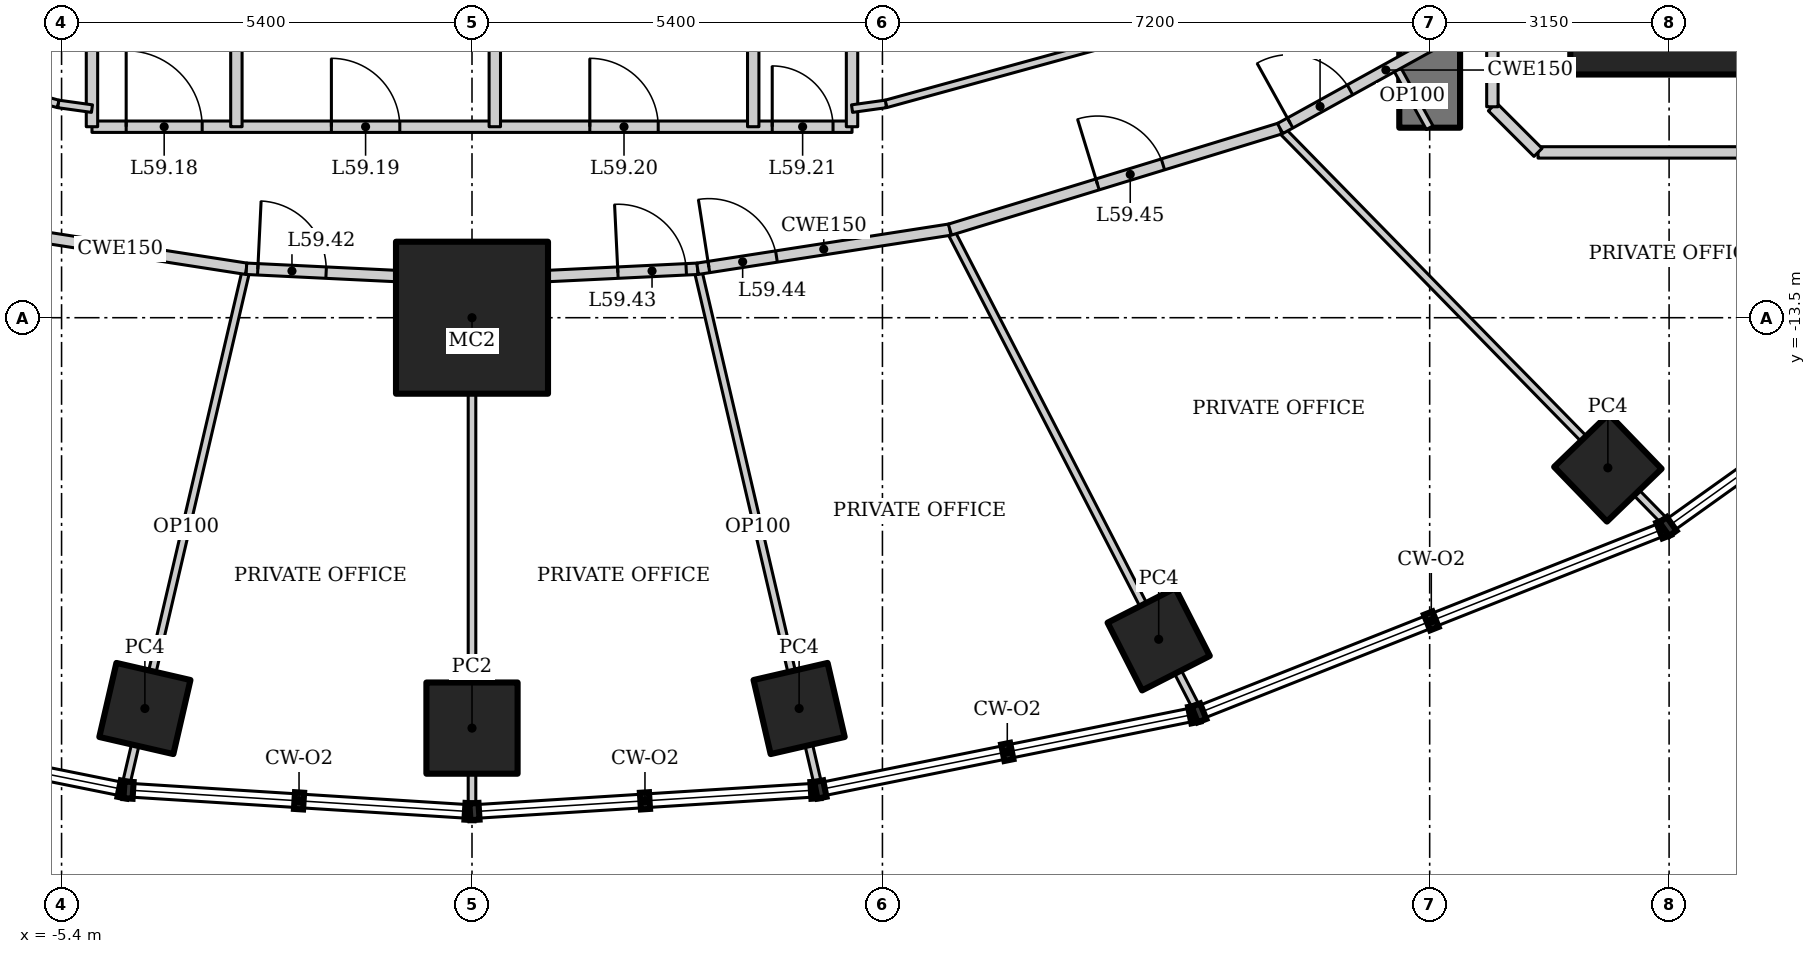
"""IFC4 building model, lengths in metres.
Left out: names, types, materials, properties, quantities, classifications, styles, units other than length and angle.
Written with IfcOpenShell. Run it as: python <this file> out.ifc"""

import sys

from ifc_helpers import new_model, si_unit, direction, frame, frame_2d, origin, origin_2d, place, context, subcontext, project, spatial, rectangle, hollow_rectangle, extrude, element, fill, save


model = new_model("IFC4")
c1 = context("Model", 3, precision=1e-05, world=origin(), true_north=direction((0.0, 1.0)))
c2 = subcontext(c1, "Body", "Model", "MODEL_VIEW")
j1 = project(units=[si_unit("LENGTHUNIT", "METRE"), si_unit("PLANEANGLEUNIT", "RADIAN")], contexts=[c1])
p1 = place(None, origin())
s1 = spatial("IfcSite", under=j1, at=p1, CompositionType="ELEMENT")
p2 = place(p1, origin())
s2 = spatial("IfcBuilding", under=s1, at=p2, CompositionType="ELEMENT")
p3 = place(p2, frame((0.0, 0.0, 253.6)))
s3 = spatial("IfcBuildingStorey", under=s2, at=p3, CompositionType="ELEMENT", Elevation=253.6)
p4 = place(p3, frame((0.0, -13.5, 0.0), z_axis=(0.0, 0.0, 1.0), x_axis=(1.0, 0.0, 0.0)))
e1 = element("IfcColumn", 1, at=p4, inside=s3, PredefinedType="COLUMN", context=c2, shape_type="SweptSolid", body=[
    extrude(hollow_rectangle(XDim=2.0, YDim=2.0, WallThickness=0.17, at=origin_2d()), origin(), (0.0, 0.0, 1.0), 4.2),
])
p5 = place(p3, frame((15.75, -9.0, 0.0), z_axis=(0.0, 0.0, 1.0), x_axis=(1.0, 0.0, 0.0)))
e2 = element("IfcColumn", 2, at=p5, inside=s3, PredefinedType="COLUMN", context=c2, shape_type="SweptSolid", body=[
    extrude(hollow_rectangle(XDim=2.6, YDim=2.6, WallThickness=0.13, at=origin_2d()), origin(), (0.0, 0.0, 1.0), 4.2),
])
p6 = place(p3, frame((-4.304, -18.642, 0.0), z_axis=(0.0, 0.0, 1.0), x_axis=(0.224951054344, 0.974370064785, 0.0)))
e3 = element("IfcColumn", 3, at=p6, inside=s3, PredefinedType="COLUMN", context=c2, shape_type="SweptSolid", body=[
    extrude(hollow_rectangle(XDim=1.0, YDim=1.0, WallThickness=0.08, at=origin_2d()), origin(), (0.0, 0.0, 1.0), 4.2),
])
p7 = place(p3, frame((0.0, -18.9, 0.0), z_axis=(0.0, 0.0, 1.0), x_axis=(1.0, 0.0, 0.0)))
e4 = element("IfcColumn", 4, at=p7, inside=s3, PredefinedType="COLUMN", context=c2, shape_type="SweptSolid", body=[
    extrude(hollow_rectangle(XDim=1.2, YDim=1.2, WallThickness=0.1, at=origin_2d()), origin(), (0.0, 0.0, 1.0), 4.2),
])
for number, where, z_axis, x_axis in (
    (5, (4.304, -18.642, 0.0), (0.0, 0.0, 1.0), (0.974, 0.225, 0.0)),
    (6, (9.035, -17.731, 0.0), (0.0, 0.0, 1.0), (0.891, 0.454, 0.0)),
    (7, (14.944, -15.475, 0.0), (0.0, 0.0, 1.0), (0.719, 0.695, 0.0)),
):
    element("IfcColumn", number, at=place(p3, frame(where, z_axis=z_axis, x_axis=x_axis)), inside=s3, PredefinedType="COLUMN", context=c2, shape_type="SweptSolid", body=[
        extrude(hollow_rectangle(XDim=1.0, YDim=1.0, WallThickness=0.08, at=origin_2d()), origin(), (0.0, 0.0, 1.0), 4.2),
    ])
p8 = place(p3, frame((12.6, -11.0, 0.0), z_axis=(0.0, 0.0, 1.0), x_axis=(0.0, 1.0, 0.0)))
e8 = element("IfcWall", 8, at=p8, inside=s3, PredefinedType="SHEAR", context=c2, shape_type="SweptSolid", body=[
    extrude(rectangle(XDim=22.0, YDim=0.8, at=frame_2d((11.0, 0.0))), origin(), (0.0, 0.0, 1.0), 4.2),
])
p9 = place(p8, frame((10.1, 0.0, 0.0)))
e9 = element("IfcOpeningElement", 9, at=p9, cuts=e8, PredefinedType="OPENING", context=c2, shape_type="SweptSolid", body=[
    extrude(rectangle(XDim=1.8, YDim=2.1, at=frame_2d((0.9, 1.05))), frame((0.0, 0.41, 0.0), z_axis=(0.0, -1.0, 0.0), x_axis=(1.0, 0.0, 0.0)), (0.0, 0.0, 1.0), 0.82),
])
p10 = place(p3, frame((-4.556, -19.657, 0.0), z_axis=(0.0, 0.0, 1.0), x_axis=(0.22733791689, 0.973815933092, 0.0)))
e10 = element("IfcWall", 10, at=p10, inside=s3, PredefinedType="PARTITIONING", context=c2, shape_type="SweptSolid", body=[
    extrude(rectangle(XDim=6.984, YDim=0.1, at=frame_2d((3.492, 0.0))), origin(), (0.0, 0.0, 1.0), 3.293),
])
p11 = place(p3, frame((0.0, -19.945, 0.0), z_axis=(0.0, 0.0, 1.0), x_axis=(0.0, 1.0, 0.0)))
e11 = element("IfcWall", 11, at=p11, inside=s3, PredefinedType="PARTITIONING", context=c2, shape_type="SweptSolid", body=[
    extrude(rectangle(XDim=6.945, YDim=0.1, at=frame_2d((3.472, 0.0))), origin(), (0.0, 0.0, 1.0), 3.644),
])
p12 = place(p3, frame((4.556, -19.657, 0.0), z_axis=(0.0, 0.0, 1.0), x_axis=(-0.22733791689, 0.973815933092, 0.0)))
e12 = element("IfcWall", 12, at=p12, inside=s3, PredefinedType="PARTITIONING", context=c2, shape_type="SweptSolid", body=[
    extrude(rectangle(XDim=6.984, YDim=0.1, at=frame_2d((3.492, 0.0))), origin(), (0.0, 0.0, 1.0), 3.293),
])
p13 = place(p3, frame((9.54, -18.65, 0.0), z_axis=(0.0, 0.0, 1.0), x_axis=(-0.45810402165, 0.88889859115, 0.0)))
e13 = element("IfcWall", 13, at=p13, inside=s3, PredefinedType="PARTITIONING", context=c2, shape_type="SweptSolid", body=[
    extrude(rectangle(XDim=7.098, YDim=0.1, at=frame_2d((3.549, 0.0))), origin(), (0.0, 0.0, 1.0), 3.293),
])
p14 = place(p3, frame((15.709, -16.199, 0.0), z_axis=(0.0, 0.0, 1.0), x_axis=(-0.699362525935, 0.714767135029, 0.0)))
e14 = element("IfcWall", 14, at=p14, inside=s3, PredefinedType="PARTITIONING", context=c2, shape_type="SweptSolid", body=[
    extrude(rectangle(XDim=7.259, YDim=0.1, at=frame_2d((3.629, 0.0))), origin(), (0.0, 0.0, 1.0), 3.41),
])
p15 = place(p3, frame((-6.288, -12.341, 0.0), z_axis=(0.0, 0.0, 1.0), x_axis=(0.988174283057, -0.153334882869, 0.0)))
e15 = element("IfcWall", 15, at=p15, inside=s3, PredefinedType="PARTITIONING", context=c2, shape_type="SweptSolid", body=[
    extrude(rectangle(XDim=3.36, YDim=0.15, at=frame_2d((1.68, 0.0))), origin(), (0.0, 0.0, 1.0), 4.05),
])
p16 = place(p3, frame((-2.968, -12.856, 0.0), z_axis=(0.0, 0.0, 1.0), x_axis=(0.998824412818, -0.04847465687, 0.0)))
e16 = element("IfcWall", 16, at=p16, inside=s3, PredefinedType="PARTITIONING", context=c2, shape_type="SweptSolid", body=[
    extrude(rectangle(XDim=2.971, YDim=0.15, at=frame_2d((1.486, 0.0))), origin(), (0.0, 0.0, 1.0), 4.05),
])
p17 = place(p16, frame((0.15, 0.0, 0.0)))
e17 = element("IfcOpeningElement", 17, at=p17, cuts=e16, PredefinedType="OPENING", context=c2, shape_type="SweptSolid", body=[
    extrude(rectangle(XDim=0.9, YDim=2.1, at=frame_2d((0.45, 1.05))), frame((0.0, 0.085, 0.0), z_axis=(0.0, -1.0, 0.0), x_axis=(1.0, 0.0, 0.0)), (0.0, 0.0, 1.0), 0.17),
])
p18 = place(p3, frame((0.0, -13.0, 0.0), z_axis=(0.0, 0.0, 1.0), x_axis=(0.998824412818, 0.04847465687, 0.0)))
e18 = element("IfcWall", 18, at=p18, inside=s3, PredefinedType="PARTITIONING", context=c2, shape_type="SweptSolid", body=[
    extrude(rectangle(XDim=2.971, YDim=0.15, at=frame_2d((1.486, 0.0))), origin(), (0.0, 0.0, 1.0), 4.05),
])
p19 = place(p18, frame((1.921, 0.0, 0.0)))
e19 = element("IfcOpeningElement", 19, at=p19, cuts=e18, PredefinedType="OPENING", context=c2, shape_type="SweptSolid", body=[
    extrude(rectangle(XDim=0.9, YDim=2.1, at=frame_2d((0.45, 1.05))), frame((0.0, 0.085, 0.0), z_axis=(0.0, -1.0, 0.0), x_axis=(1.0, 0.0, 0.0)), (0.0, 0.0, 1.0), 0.17),
])
p20 = place(p3, frame((2.968, -12.856, 0.0), z_axis=(0.0, 0.0, 1.0), x_axis=(0.988174283057, 0.153334882869, 0.0)))
e20 = element("IfcWall", 20, at=p20, inside=s3, PredefinedType="PARTITIONING", context=c2, shape_type="SweptSolid", body=[
    extrude(rectangle(XDim=3.36, YDim=0.15, at=frame_2d((1.68, 0.0))), origin(), (0.0, 0.0, 1.0), 4.05),
])
p21 = place(p20, frame((0.15, 0.0, 0.0)))
e21 = element("IfcOpeningElement", 21, at=p21, cuts=e20, PredefinedType="OPENING", context=c2, shape_type="SweptSolid", body=[
    extrude(rectangle(XDim=0.9, YDim=2.1, at=frame_2d((0.45, 1.05))), frame((0.0, 0.085, 0.0), z_axis=(0.0, -1.0, 0.0), x_axis=(1.0, 0.0, 0.0)), (0.0, 0.0, 1.0), 0.17),
])
p22 = place(p3, frame((6.288, -12.341, 0.0), z_axis=(0.0, 0.0, 1.0), x_axis=(0.956185837153, 0.292760388079, 0.0)))
e22 = element("IfcWall", 22, at=p22, inside=s3, PredefinedType="PARTITIONING", context=c2, shape_type="SweptSolid", body=[
    extrude(rectangle(XDim=4.544, YDim=0.15, at=frame_2d((2.272, 0.0))), origin(), (0.0, 0.0, 1.0), 4.05),
])
p23 = place(p22, frame((2.031, 0.0, 0.0)))
e23 = element("IfcOpeningElement", 23, at=p23, cuts=e22, PredefinedType="OPENING", context=c2, shape_type="SweptSolid", body=[
    extrude(rectangle(XDim=0.9, YDim=2.1, at=frame_2d((0.45, 1.05))), frame((0.0, 0.085, 0.0), z_axis=(0.0, -1.0, 0.0), x_axis=(1.0, 0.0, 0.0)), (0.0, 0.0, 1.0), 0.17),
])
p24 = place(p3, frame((-5.0, -10.987, 0.0), z_axis=(0.0, 0.0, 1.0), x_axis=(1.0, 0.0, 0.0)))
e24 = element("IfcWall", 24, at=p24, inside=s3, PredefinedType="SOLIDWALL", context=c2, shape_type="SweptSolid", body=[
    extrude(rectangle(XDim=10.0, YDim=0.15, at=frame_2d((5.0, 0.0))), origin(), (0.0, 0.0, 1.0), 4.05),
])
p25 = place(p24, frame((0.45, 0.0, 0.0)))
e25 = element("IfcOpeningElement", 25, at=p25, cuts=e24, PredefinedType="OPENING", context=c2, shape_type="SweptSolid", body=[
    extrude(rectangle(XDim=1.0, YDim=2.1, at=frame_2d((0.5, 1.05))), frame((0.0, 0.085, 0.0), z_axis=(0.0, -1.0, 0.0), x_axis=(1.0, 0.0, 0.0)), (0.0, 0.0, 1.0), 0.17),
])
p26 = place(p24, frame((3.15, 0.0, 0.0)))
e26 = element("IfcOpeningElement", 26, at=p26, cuts=e24, PredefinedType="OPENING", context=c2, shape_type="SweptSolid", body=[
    extrude(rectangle(XDim=0.9, YDim=2.1, at=frame_2d((0.45, 1.05))), frame((0.0, 0.085, 0.0), z_axis=(0.0, -1.0, 0.0), x_axis=(1.0, 0.0, 0.0)), (0.0, 0.0, 1.0), 0.17),
])
p27 = place(p24, frame((6.55, 0.0, 0.0)))
e27 = element("IfcOpeningElement", 27, at=p27, cuts=e24, PredefinedType="OPENING", context=c2, shape_type="SweptSolid", body=[
    extrude(rectangle(XDim=0.9, YDim=2.1, at=frame_2d((0.45, 1.05))), frame((0.0, 0.085, 0.0), z_axis=(0.0, -1.0, 0.0), x_axis=(1.0, 0.0, 0.0)), (0.0, 0.0, 1.0), 0.17),
])
p28 = place(p24, frame((8.95, 0.0, 0.0)))
e28 = element("IfcOpeningElement", 28, at=p28, cuts=e24, PredefinedType="OPENING", context=c2, shape_type="SweptSolid", body=[
    extrude(rectangle(XDim=0.8, YDim=2.1, at=frame_2d((0.4, 1.05))), frame((0.0, 0.085, 0.0), z_axis=(0.0, -1.0, 0.0), x_axis=(1.0, 0.0, 0.0)), (0.0, 0.0, 1.0), 0.17),
])
for number, where, z_axis, x_axis in (
    (29, (-5.0, -7.8, 0.0), (0.0, 0.0, 1.0), (0.0, -1.0, 0.0)),
    (30, (5.0, -7.8, 0.0), (0.0, 0.0, 1.0), (0.0, -1.0, 0.0)),
    (31, (-3.1, -7.8, 0.0), (0.0, 0.0, 1.0), (0.0, -1.0, 0.0)),
    (32, (0.3, -7.8, 0.0), (0.0, 0.0, 1.0), (0.0, -1.0, 0.0)),
    (33, (3.7, -7.8, 0.0), (0.0, 0.0, 1.0), (0.0, -1.0, 0.0)),
):
    element("IfcWall", number, at=place(p3, frame(where, z_axis=z_axis, x_axis=x_axis)), inside=s3, PredefinedType="SOLIDWALL", context=c2, shape_type="SweptSolid", body=[
        extrude(rectangle(XDim=3.187, YDim=0.15, at=frame_2d((1.594, 0.0))), origin(), (0.0, 0.0, 1.0), 4.05),
    ])
p29 = place(p3, frame((-5.0, -10.749, 0.0), z_axis=(0.0, 0.0, 1.0), x_axis=(-0.990442882696, 0.137923515463, 0.0)))
e34 = element("IfcWall", 34, at=p29, inside=s3, PredefinedType="PARTITIONING", context=c2, shape_type="SweptSolid", body=[
    extrude(rectangle(XDim=0.45, YDim=0.1, at=frame_2d((0.225, 0.0))), origin(), (0.0, 0.0, 1.0), 4.05),
])
for number, where, z_axis, x_axis in (
    (35, (-5.445, -10.687, 0.0), (0.0, 0.0, 1.0), (-0.964, 0.265, 0.0)),
    (36, (9.298, -9.628, 0.0), (0.0, 0.0, 1.0), (-0.964, -0.265, 0.0)),
):
    element("IfcWall", number, at=place(p3, frame(where, z_axis=z_axis, x_axis=x_axis)), inside=s3, PredefinedType="PARTITIONING", context=c2, shape_type="SweptSolid", body=[
        extrude(rectangle(XDim=3.995, YDim=0.1, at=frame_2d((1.998, 0.0))), origin(), (0.0, 0.0, 1.0), 4.05),
    ])
p30 = place(p3, frame((5.445, -10.687, 0.0), z_axis=(0.0, 0.0, 1.0), x_axis=(-0.990442882696, -0.137923515463, 0.0)))
e37 = element("IfcWall", 37, at=p30, inside=s3, PredefinedType="PARTITIONING", context=c2, shape_type="SweptSolid", body=[
    extrude(rectangle(XDim=0.45, YDim=0.1, at=frame_2d((0.225, 0.0))), origin(), (0.0, 0.0, 1.0), 4.05),
])
p31 = place(p3, frame((12.6, -11.0, 0.0), z_axis=(0.0, 0.0, 1.0), x_axis=(-0.484103558985, 0.875010710893, 0.0)))
e38 = element("IfcWall", 38, at=p31, inside=s3, PredefinedType="PARTITIONING", context=c2, shape_type="SweptSolid", body=[
    extrude(rectangle(XDim=0.943, YDim=0.1, at=frame_2d((0.472, 0.0))), origin(), (0.0, 0.0, 1.0), 4.05),
])
p32 = place(p3, frame((10.633, -11.01, 0.0), z_axis=(0.0, 0.0, 1.0), x_axis=(0.875072100837, 0.483992580869, 0.0)))
e39 = element("IfcWall", 39, at=p32, inside=s3, PredefinedType="PARTITIONING", context=c2, shape_type="SweptSolid", body=[
    extrude(rectangle(XDim=3.179, YDim=0.15, at=frame_2d((1.59, 0.0))), origin(), (0.0, 0.0, 1.0), 4.05),
])
p33 = place(p32, frame((0.15, 0.0, 0.0)))
e40 = element("IfcOpeningElement", 40, at=p33, cuts=e39, PredefinedType="OPENING", context=c2, shape_type="SweptSolid", body=[
    extrude(rectangle(XDim=0.9, YDim=2.1, at=frame_2d((0.45, 1.05))), frame((0.0, 0.085, 0.0), z_axis=(0.0, -1.0, 0.0), x_axis=(1.0, 0.0, 0.0)), (0.0, 0.0, 1.0), 0.17),
])
p34 = place(p3, frame((17.475, -11.325, 0.0), z_axis=(0.0, 0.0, 1.0), x_axis=(-1.0, 0.0, 0.0)))
e41 = element("IfcWall", 41, at=p34, inside=s3, PredefinedType="PARTITIONING", context=c2, shape_type="SweptSolid", body=[
    extrude(rectangle(XDim=3.449, YDim=0.15, at=frame_2d((1.725, 0.0))), origin(), (0.0, 0.0, 1.0), 4.05),
])
p35 = place(p3, frame((14.025, -11.325, 0.0), z_axis=(0.0, 0.0, 1.0), x_axis=(-0.707106781187, 0.707106781187, 0.0)))
e42 = element("IfcWall", 42, at=p35, inside=s3, PredefinedType="PARTITIONING", context=c2, shape_type="SweptSolid", body=[
    extrude(rectangle(XDim=0.849, YDim=0.15, at=frame_2d((0.425, 0.0))), origin(), (0.0, 0.0, 1.0), 4.05),
])
p36 = place(p3, frame((13.425, -10.725, 0.0), z_axis=(0.0, 0.0, 1.0), x_axis=(0.0, 1.0, 0.0)))
e43 = element("IfcWall", 43, at=p36, inside=s3, PredefinedType="PARTITIONING", context=c2, shape_type="SweptSolid", body=[
    extrude(rectangle(XDim=1.138, YDim=0.15, at=frame_2d((0.569, 0.0))), origin(), (0.0, 0.0, 1.0), 4.05),
])
p37 = place(p25, origin())
e44 = element("IfcDoor", 44, at=p37, inside=s3, OperationType="SINGLE_SWING_LEFT", PredefinedType="DOOR", context=c2, shape_type="SweptSolid", body=[
    extrude(rectangle(XDim=1.0, YDim=2.1, at=frame_2d((0.5, 1.05))), frame((0.0, 0.025, 0.0), z_axis=(0.0, -1.0, 0.0), x_axis=(1.0, 0.0, 0.0)), (0.0, 0.0, 1.0), 0.05),
])
fill(e25, e44)
p38 = place(p26, origin())
e45 = element("IfcDoor", 45, at=p38, inside=s3, OperationType="SINGLE_SWING_LEFT", PredefinedType="DOOR", context=c2, shape_type="SweptSolid", body=[
    extrude(rectangle(XDim=0.9, YDim=2.1, at=frame_2d((0.45, 1.05))), frame((0.0, 0.025, 0.0), z_axis=(0.0, -1.0, 0.0), x_axis=(1.0, 0.0, 0.0)), (0.0, 0.0, 1.0), 0.05),
])
fill(e26, e45)
p39 = place(p27, origin())
e46 = element("IfcDoor", 46, at=p39, inside=s3, OperationType="SINGLE_SWING_LEFT", PredefinedType="DOOR", context=c2, shape_type="SweptSolid", body=[
    extrude(rectangle(XDim=0.9, YDim=2.1, at=frame_2d((0.45, 1.05))), frame((0.0, 0.025, 0.0), z_axis=(0.0, -1.0, 0.0), x_axis=(1.0, 0.0, 0.0)), (0.0, 0.0, 1.0), 0.05),
])
fill(e27, e46)
p40 = place(p28, origin())
e47 = element("IfcDoor", 47, at=p40, inside=s3, OperationType="SINGLE_SWING_LEFT", PredefinedType="DOOR", context=c2, shape_type="SweptSolid", body=[
    extrude(rectangle(XDim=0.8, YDim=2.1, at=frame_2d((0.4, 1.05))), frame((0.0, 0.025, 0.0), z_axis=(0.0, -1.0, 0.0), x_axis=(1.0, 0.0, 0.0)), (0.0, 0.0, 1.0), 0.05),
])
fill(e28, e47)
p41 = place(p17, origin())
e48 = element("IfcDoor", 48, at=p41, inside=s3, OperationType="SINGLE_SWING_LEFT", PredefinedType="DOOR", context=c2, shape_type="SweptSolid", body=[
    extrude(rectangle(XDim=0.9, YDim=2.1, at=frame_2d((0.45, 1.05))), frame((0.0, 0.025, 0.0), z_axis=(0.0, -1.0, 0.0), x_axis=(1.0, 0.0, 0.0)), (0.0, 0.0, 1.0), 0.05),
])
fill(e17, e48)
p42 = place(p19, origin())
e49 = element("IfcDoor", 49, at=p42, inside=s3, OperationType="SINGLE_SWING_LEFT", PredefinedType="DOOR", context=c2, shape_type="SweptSolid", body=[
    extrude(rectangle(XDim=0.9, YDim=2.1, at=frame_2d((0.45, 1.05))), frame((0.0, 0.025, 0.0), z_axis=(0.0, -1.0, 0.0), x_axis=(1.0, 0.0, 0.0)), (0.0, 0.0, 1.0), 0.05),
])
fill(e19, e49)
p43 = place(p21, origin())
e50 = element("IfcDoor", 50, at=p43, inside=s3, OperationType="SINGLE_SWING_LEFT", PredefinedType="DOOR", context=c2, shape_type="SweptSolid", body=[
    extrude(rectangle(XDim=0.9, YDim=2.1, at=frame_2d((0.45, 1.05))), frame((0.0, 0.025, 0.0), z_axis=(0.0, -1.0, 0.0), x_axis=(1.0, 0.0, 0.0)), (0.0, 0.0, 1.0), 0.05),
])
fill(e21, e50)
p44 = place(p23, origin())
e51 = element("IfcDoor", 51, at=p44, inside=s3, OperationType="SINGLE_SWING_LEFT", PredefinedType="DOOR", context=c2, shape_type="SweptSolid", body=[
    extrude(rectangle(XDim=0.9, YDim=2.1, at=frame_2d((0.45, 1.05))), frame((0.0, 0.025, 0.0), z_axis=(0.0, -1.0, 0.0), x_axis=(1.0, 0.0, 0.0)), (0.0, 0.0, 1.0), 0.05),
])
fill(e23, e51)
p45 = place(p33, origin())
e52 = element("IfcDoor", 52, at=p45, inside=s3, OperationType="SINGLE_SWING_LEFT", PredefinedType="DOOR", context=c2, shape_type="SweptSolid", body=[
    extrude(rectangle(XDim=0.9, YDim=2.1, at=frame_2d((0.45, 1.05))), frame((0.0, 0.025, 0.0), z_axis=(0.0, -1.0, 0.0), x_axis=(1.0, 0.0, 0.0)), (0.0, 0.0, 1.0), 0.05),
])
fill(e40, e52)
save(model, sys.argv[1])
